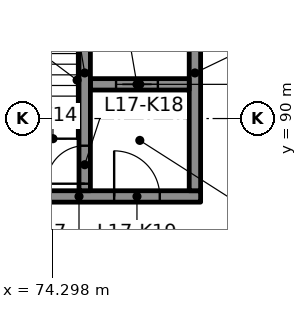
"""IFC4 building model, lengths in metres.
Left out: names, types, materials, properties, quantities, classifications, styles, units other than length and angle.
Written with IfcOpenShell. Run it as: python <this file> out.ifc"""

import sys

from ifc_helpers import new_model, si_unit, direction, frame, frame_2d, origin, place, context, subcontext, project, spatial, rectangle, extrude, element, fill, save


model = new_model("IFC4")
c1 = context("Model", 3, precision=1e-05, world=origin(), true_north=direction((0.0, 1.0)))
c2 = subcontext(c1, "Body", "Model", "MODEL_VIEW")
j1 = project(units=[si_unit("LENGTHUNIT", "METRE"), si_unit("PLANEANGLEUNIT", "RADIAN")], contexts=[c1])
p1 = place(None, origin())
s1 = spatial("IfcSite", under=j1, at=p1, CompositionType="ELEMENT")
p2 = place(p1, origin())
s2 = spatial("IfcBuilding", under=s1, at=p2, CompositionType="ELEMENT")
p3 = place(p2, frame((0.0, 0.0, 77.8)))
s3 = spatial("IfcBuildingStorey", under=s2, at=p3, CompositionType="ELEMENT", Elevation=77.8)
p4 = place(p3, frame((71.8, 87.95, 0.0), z_axis=(0.0, 0.0, 1.0), x_axis=(1.0, 0.0, 0.0)))
e1 = element("IfcWall", 1, at=p4, inside=s3, PredefinedType="SHEAR", context=c2, shape_type="SweptSolid", body=[
    extrude(rectangle(XDim=6.4, YDim=0.3, at=frame_2d((3.2, 0.0))), origin(), (0.0, 0.0, 1.0), 4.0),
])
p5 = place(p4, frame((1.325, 0.0, 0.0)))
e2 = element("IfcOpeningElement", 2, at=p5, cuts=e1, PredefinedType="OPENING", context=c2, shape_type="SweptSolid", body=[
    extrude(rectangle(XDim=1.0, YDim=2.1, at=frame_2d((0.5, 1.05))), frame((0.0, 0.16, 0.0), z_axis=(0.0, -1.0, 0.0), x_axis=(1.0, 0.0, 0.0)), (0.0, 0.0, 1.0), 0.32),
])
p6 = place(p4, frame((4.125, 0.0, 0.0)))
e3 = element("IfcOpeningElement", 3, at=p6, cuts=e1, PredefinedType="OPENING", context=c2, shape_type="SweptSolid", body=[
    extrude(rectangle(XDim=1.2, YDim=2.1, at=frame_2d((0.6, 1.05))), frame((0.0, 0.16, 0.0), z_axis=(0.0, -1.0, 0.0), x_axis=(1.0, 0.0, 0.0)), (0.0, 0.0, 1.0), 0.32),
])
p7 = place(p3, frame((78.05, 88.1, 0.0), z_axis=(0.0, 0.0, 1.0), x_axis=(0.0, 1.0, 0.0)))
e4 = element("IfcWall", 4, at=p7, inside=s3, PredefinedType="SHEAR", context=c2, shape_type="SweptSolid", body=[
    extrude(rectangle(XDim=6.2, YDim=0.3, at=frame_2d((3.1, 0.0))), origin(), (0.0, 0.0, 1.0), 4.0),
])
p8 = place(p3, frame((75.3, 90.9, 0.0), z_axis=(0.0, 0.0, 1.0), x_axis=(1.0, 0.0, 0.0)))
e5 = element("IfcWall", 5, at=p8, inside=s3, PredefinedType="SHEAR", context=c2, shape_type="SweptSolid", body=[
    extrude(rectangle(XDim=2.6, YDim=0.3, at=frame_2d((1.3, 0.0))), origin(), (0.0, 0.0, 1.0), 4.0),
])
p9 = place(p8, frame((0.675, 0.0, 0.0)))
e6 = element("IfcOpeningElement", 6, at=p9, cuts=e5, PredefinedType="OPENING", context=c2, shape_type="SweptSolid", body=[
    extrude(rectangle(XDim=1.1, YDim=2.1, at=frame_2d((0.55, 1.05))), frame((0.0, 0.16, 0.0), z_axis=(0.0, -1.0, 0.0), x_axis=(1.0, 0.0, 0.0)), (0.0, 0.0, 1.0), 0.32),
])
p10 = place(p3, frame((75.15, 88.1, 0.0), z_axis=(0.0, 0.0, 1.0), x_axis=(0.0, 1.0, 0.0)))
e7 = element("IfcWall", 7, at=p10, inside=s3, PredefinedType="SHEAR", context=c2, shape_type="SweptSolid", body=[
    extrude(rectangle(XDim=6.2, YDim=0.3, at=frame_2d((3.1, 0.0))), origin(), (0.0, 0.0, 1.0), 4.0),
])
p11 = place(p10, frame((0.185, 0.0, 0.0)))
e8 = element("IfcOpeningElement", 8, at=p11, cuts=e7, PredefinedType="OPENING", context=c2, shape_type="SweptSolid", body=[
    extrude(rectangle(XDim=1.0, YDim=2.1, at=frame_2d((0.5, 1.05))), frame((0.0, 0.16, 0.0), z_axis=(0.0, -1.0, 0.0), x_axis=(1.0, 0.0, 0.0)), (0.0, 0.0, 1.0), 0.32),
])
p12 = place(p9, origin())
e9 = element("IfcDoor", 9, at=p12, inside=s3, OperationType="DOUBLE_DOOR_SLIDING", PredefinedType="DOOR", context=c2, shape_type="SweptSolid", body=[
    extrude(rectangle(XDim=1.1, YDim=2.1, at=frame_2d((0.55, 1.05))), frame((0.0, 0.025, 0.0), z_axis=(0.0, -1.0, 0.0), x_axis=(1.0, 0.0, 0.0)), (0.0, 0.0, 1.0), 0.05),
])
fill(e6, e9)
p13 = place(p11, origin())
e10 = element("IfcDoor", 10, at=p13, inside=s3, OperationType="SINGLE_SWING_LEFT", PredefinedType="DOOR", context=c2, shape_type="SweptSolid", body=[
    extrude(rectangle(XDim=1.0, YDim=2.1, at=frame_2d((0.5, 1.05))), frame((0.0, 0.025, 0.0), z_axis=(0.0, -1.0, 0.0), x_axis=(1.0, 0.0, 0.0)), (0.0, 0.0, 1.0), 0.05),
])
fill(e8, e10)
p14 = place(p6, origin())
e11 = element("IfcDoor", 11, at=p14, inside=s3, OperationType="SINGLE_SWING_RIGHT", PredefinedType="DOOR", context=c2, shape_type="SweptSolid", body=[
    extrude(rectangle(XDim=1.2, YDim=2.1, at=frame_2d((0.6, 1.05))), frame((0.0, 0.025, 0.0), z_axis=(0.0, -1.0, 0.0), x_axis=(1.0, 0.0, 0.0)), (0.0, 0.0, 1.0), 0.05),
])
fill(e3, e11)
save(model, sys.argv[1])
